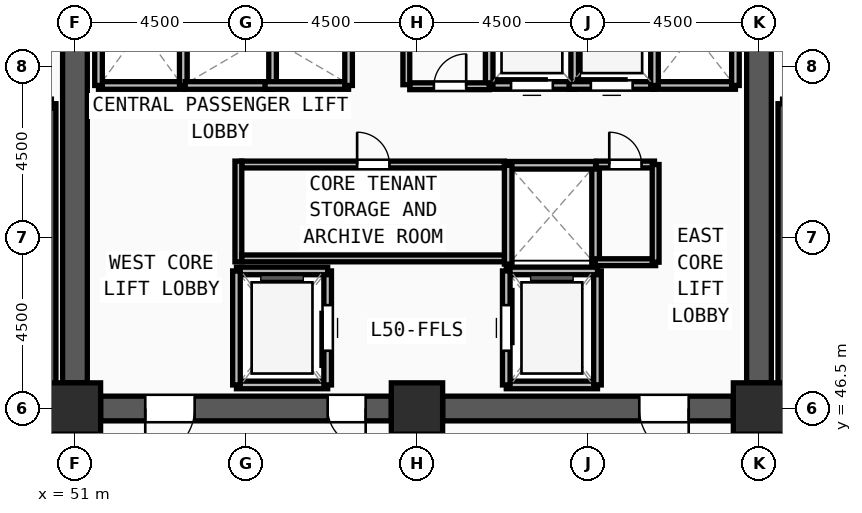
"""IFC4 building model, lengths in metres.
Left out: names, types, materials, properties, quantities, classifications, styles, units other than length and angle.
Written with IfcOpenShell. Run it as: python <this file> out.ifc"""

import sys

from ifc_helpers import new_model, si_unit, direction, frame, frame_2d, origin, origin_2d, place, context, subcontext, project, spatial, rectangle, extrude, source, transform, mapped, element, fill, save


model = new_model("IFC4")
c1 = context("Model", 3, precision=1e-05, world=origin(), true_north=direction((0.0, 1.0)))
c2 = subcontext(c1, "Body", "Model", "MODEL_VIEW")
j1 = project(units=[si_unit("LENGTHUNIT", "METRE"), si_unit("PLANEANGLEUNIT", "RADIAN")], contexts=[c1])
p1 = place(None, origin())
s1 = spatial("IfcSite", under=j1, at=p1, CompositionType="ELEMENT")
p2 = place(p1, origin())
s2 = spatial("IfcBuilding", under=s1, at=p2, CompositionType="ELEMENT")
p3 = place(p2, frame((0.0, 0.0, 194.25)))
s3 = spatial("IfcBuildingStorey", under=s2, at=p3, CompositionType="ELEMENT", Elevation=194.25)
m1 = source(origin(), c2, "Body", "SweptSolid", [
    extrude(rectangle(XDim=1.35, YDim=1.35, at=origin_2d()), origin(), (0.0, 0.0, 1.0), 3.75),
])
for number, where, z_axis, x_axis in (
    (1, (51.0, 46.5, 0.0), (0.0, 0.0, 1.0), (1.0, 0.0, 0.0)),
    (2, (60.0, 46.5, 0.0), (0.0, 0.0, 1.0), (1.0, 0.0, 0.0)),
    (3, (69.0, 46.5, 0.0), (0.0, 0.0, 1.0), (1.0, 0.0, 0.0)),
):
    element("IfcColumn", number, at=place(p3, frame(where, z_axis=z_axis, x_axis=x_axis)), inside=s3, PredefinedType="COLUMN", context=c2, shape_type="MappedRepresentation", body=[
        mapped(m1, transform((0.0, 0.0, 0.0), x_axis=(1.0, 0.0, 0.0), y_axis=(0.0, 1.0, 0.0), z_axis=(0.0, 0.0, 1.0), scale=1.0)),
    ])
p4 = place(p3, frame((69.0, 60.825, 0.0), z_axis=(0.0, 0.0, 1.0), x_axis=(0.0, -1.0, 0.0)))
e4 = element("IfcWall", 4, at=p4, inside=s3, PredefinedType="SHEAR", context=c2, shape_type="SweptSolid", body=[
    extrude(rectangle(XDim=13.65, YDim=0.65, at=frame_2d((6.825, 0.0))), origin(), (0.0, 0.0, 1.0), 3.57),
])
m2 = source(origin(), c2, "Body", "SweptSolid", [
    extrude(rectangle(XDim=1.2, YDim=2.2, at=frame_2d((0.6, 1.1))), frame((0.0, 0.335, 0.0), z_axis=(0.0, -1.0, 0.0), x_axis=(1.0, 0.0, 0.0)), (0.0, 0.0, 1.0), 0.67),
])
p5 = place(p4, frame((1.275, 0.0, 0.0)))
e5 = element("IfcOpeningElement", 5, at=p5, cuts=e4, PredefinedType="OPENING", context=c2, shape_type="MappedRepresentation", body=[
    mapped(m2, transform((0.0, 0.0, 0.0), x_axis=(1.0, 0.0, 0.0), y_axis=(0.0, 1.0, 0.0), z_axis=(0.0, 0.0, 1.0), scale=1.0)),
])
p6 = place(p3, frame((68.325, 46.5, 0.0), z_axis=(0.0, 0.0, 1.0), x_axis=(-1.0, 0.0, 0.0)))
e6 = element("IfcWall", 6, at=p6, inside=s3, PredefinedType="SHEAR", context=c2, shape_type="SweptSolid", body=[
    extrude(rectangle(XDim=7.65, YDim=0.65, at=frame_2d((3.825, 0.0))), origin(), (0.0, 0.0, 1.0), 3.57),
])
m3 = source(origin(), c2, "Body", "SweptSolid", [
    extrude(rectangle(XDim=1.3, YDim=2.2, at=frame_2d((0.65, 1.1))), frame((0.0, 0.335, 0.0), z_axis=(0.0, -1.0, 0.0), x_axis=(1.0, 0.0, 0.0)), (0.0, 0.0, 1.0), 0.67),
])
p7 = place(p6, frame((1.175, 0.0, 0.0)))
e7 = element("IfcOpeningElement", 7, at=p7, cuts=e6, PredefinedType="OPENING", context=c2, shape_type="MappedRepresentation", body=[
    mapped(m3, transform((0.0, 0.0, 0.0), x_axis=(1.0, 0.0, 0.0), y_axis=(0.0, 1.0, 0.0), z_axis=(0.0, 0.0, 1.0), scale=1.0)),
])
p8 = place(p3, frame((59.325, 46.5, 0.0), z_axis=(0.0, 0.0, 1.0), x_axis=(-1.0, 0.0, 0.0)))
e8 = element("IfcWall", 8, at=p8, inside=s3, PredefinedType="SHEAR", context=c2, shape_type="SweptSolid", body=[
    extrude(rectangle(XDim=7.65, YDim=0.65, at=frame_2d((3.825, 0.0))), origin(), (0.0, 0.0, 1.0), 3.57),
])
p9 = place(p8, frame((5.175, 0.0, 0.0)))
e9 = element("IfcOpeningElement", 9, at=p9, cuts=e8, PredefinedType="OPENING", context=c2, shape_type="MappedRepresentation", body=[
    mapped(m3, transform((0.0, 0.0, 0.0), x_axis=(1.0, 0.0, 0.0), y_axis=(0.0, 1.0, 0.0), z_axis=(0.0, 0.0, 1.0), scale=1.0)),
])
m4 = source(origin(), c2, "Body", "SweptSolid", [
    extrude(rectangle(XDim=1.0, YDim=2.2, at=frame_2d((0.5, 1.1))), frame((0.0, 0.335, 0.0), z_axis=(0.0, -1.0, 0.0), x_axis=(1.0, 0.0, 0.0)), (0.0, 0.0, 1.0), 0.67),
])
p10 = place(p8, frame((0.675, 0.0, 0.0)))
e10 = element("IfcOpeningElement", 10, at=p10, cuts=e8, PredefinedType="OPENING", context=c2, shape_type="MappedRepresentation", body=[
    mapped(m4, transform((0.0, 0.0, 0.0), x_axis=(1.0, 0.0, 0.0), y_axis=(0.0, 1.0, 0.0), z_axis=(0.0, 0.0, 1.0), scale=1.0)),
])
p11 = place(p3, frame((51.0, 47.175, 0.0), z_axis=(0.0, 0.0, 1.0), x_axis=(0.0, 1.0, 0.0)))
e11 = element("IfcWall", 11, at=p11, inside=s3, PredefinedType="SHEAR", context=c2, shape_type="SweptSolid", body=[
    extrude(rectangle(XDim=13.65, YDim=0.65, at=frame_2d((6.825, 0.0))), origin(), (0.0, 0.0, 1.0), 3.57),
])
for number, where, z_axis, x_axis in (
    (12, (50.38, 46.7, 0.0), (0.0, 0.0, 1.0), (0.0, 1.0, 0.0)),
    (13, (69.62, 54.52, 0.0), (0.0, 0.0, 1.0), (0.0, -1.0, 0.0)),
):
    element("IfcWall", number, at=place(p3, frame(where, z_axis=z_axis, x_axis=x_axis)), inside=s3, PredefinedType="SOLIDWALL", context=c2, shape_type="SweptSolid", body=[
        extrude(rectangle(XDim=7.82, YDim=0.24, at=frame_2d((3.91, 0.0))), origin(), (0.0, 0.0, 1.0), 3.57),
    ])
p12 = place(p3, frame((55.25, 47.12, 0.0), z_axis=(0.0, 0.0, 1.0), x_axis=(1.0, 0.0, 0.0)))
e14 = element("IfcWall", 14, at=p12, inside=s3, PredefinedType="SOLIDWALL", context=c2, shape_type="SweptSolid", body=[
    extrude(rectangle(XDim=2.4, YDim=0.2, at=frame_2d((1.2, 0.0))), origin(), (0.0, 0.0, 1.0), 3.57),
])
p13 = place(p3, frame((57.65, 47.12, 0.0), z_axis=(0.0, 0.0, 1.0), x_axis=(0.0, 1.0, 0.0)))
e15 = element("IfcWall", 15, at=p13, inside=s3, PredefinedType="SOLIDWALL", context=c2, shape_type="SweptSolid", body=[
    extrude(rectangle(XDim=3.0, YDim=0.2, at=frame_2d((1.5, 0.0))), origin(), (0.0, 0.0, 1.0), 3.57),
])
m5 = source(origin(), c2, "Body", "SweptSolid", [
    extrude(rectangle(XDim=1.2, YDim=2.3, at=frame_2d((0.6, 1.15))), frame((0.0, 0.11, 0.0), z_axis=(0.0, -1.0, 0.0), x_axis=(1.0, 0.0, 0.0)), (0.0, 0.0, 1.0), 0.22),
])
p14 = place(p13, frame((0.9, 0.0, 0.0)))
e16 = element("IfcOpeningElement", 16, at=p14, cuts=e15, PredefinedType="OPENING", context=c2, shape_type="MappedRepresentation", body=[
    mapped(m5, transform((0.0, 0.0, 0.0), x_axis=(1.0, 0.0, 0.0), y_axis=(0.0, 1.0, 0.0), z_axis=(0.0, 0.0, 1.0), scale=1.0)),
])
p15 = place(p3, frame((57.65, 50.12, 0.0), z_axis=(0.0, 0.0, 1.0), x_axis=(-1.0, 0.0, 0.0)))
e17 = element("IfcWall", 17, at=p15, inside=s3, PredefinedType="SOLIDWALL", context=c2, shape_type="SweptSolid", body=[
    extrude(rectangle(XDim=2.4, YDim=0.2, at=frame_2d((1.2, 0.0))), origin(), (0.0, 0.0, 1.0), 3.57),
])
p16 = place(p3, frame((55.25, 50.12, 0.0), z_axis=(0.0, 0.0, 1.0), x_axis=(0.0, -1.0, 0.0)))
e18 = element("IfcWall", 18, at=p16, inside=s3, PredefinedType="SOLIDWALL", context=c2, shape_type="SweptSolid", body=[
    extrude(rectangle(XDim=3.0, YDim=0.2, at=frame_2d((1.5, 0.0))), origin(), (0.0, 0.0, 1.0), 3.57),
])
p17 = place(p3, frame((62.35, 47.12, 0.0), z_axis=(0.0, 0.0, 1.0), x_axis=(1.0, 0.0, 0.0)))
e19 = element("IfcWall", 19, at=p17, inside=s3, PredefinedType="SOLIDWALL", context=c2, shape_type="SweptSolid", body=[
    extrude(rectangle(XDim=2.4, YDim=0.2, at=frame_2d((1.2, 0.0))), origin(), (0.0, 0.0, 1.0), 3.57),
])
p18 = place(p3, frame((64.75, 47.12, 0.0), z_axis=(0.0, 0.0, 1.0), x_axis=(0.0, 1.0, 0.0)))
e20 = element("IfcWall", 20, at=p18, inside=s3, PredefinedType="SOLIDWALL", context=c2, shape_type="SweptSolid", body=[
    extrude(rectangle(XDim=3.0, YDim=0.2, at=frame_2d((1.5, 0.0))), origin(), (0.0, 0.0, 1.0), 3.57),
])
p19 = place(p3, frame((64.75, 50.12, 0.0), z_axis=(0.0, 0.0, 1.0), x_axis=(-1.0, 0.0, 0.0)))
e21 = element("IfcWall", 21, at=p19, inside=s3, PredefinedType="SOLIDWALL", context=c2, shape_type="SweptSolid", body=[
    extrude(rectangle(XDim=2.4, YDim=0.2, at=frame_2d((1.2, 0.0))), origin(), (0.0, 0.0, 1.0), 3.57),
])
p20 = place(p3, frame((62.35, 50.12, 0.0), z_axis=(0.0, 0.0, 1.0), x_axis=(0.0, -1.0, 0.0)))
e22 = element("IfcWall", 22, at=p20, inside=s3, PredefinedType="SOLIDWALL", context=c2, shape_type="SweptSolid", body=[
    extrude(rectangle(XDim=3.0, YDim=0.2, at=frame_2d((1.5, 0.0))), origin(), (0.0, 0.0, 1.0), 3.57),
])
p21 = place(p20, frame((0.9, 0.0, 0.0)))
e23 = element("IfcOpeningElement", 23, at=p21, cuts=e22, PredefinedType="OPENING", context=c2, shape_type="MappedRepresentation", body=[
    mapped(m5, transform((0.0, 0.0, 0.0), x_axis=(1.0, 0.0, 0.0), y_axis=(0.0, 1.0, 0.0), z_axis=(0.0, 0.0, 1.0), scale=1.0)),
])
p22 = place(p3, frame((51.62, 55.0, 0.0), z_axis=(0.0, 0.0, 1.0), x_axis=(1.0, 0.0, 0.0)))
e24 = element("IfcWall", 24, at=p22, inside=s3, PredefinedType="SOLIDWALL", context=c2, shape_type="SweptSolid", body=[
    extrude(rectangle(XDim=2.23, YDim=0.2, at=frame_2d((1.115, 0.0))), origin(), (0.0, 0.0, 1.0), 3.57),
])
for number, where, z_axis, x_axis in (
    (25, (53.85, 55.0, 0.0), (0.0, 0.0, 1.0), (0.0, 1.0, 0.0)),
    (26, (51.62, 58.0, 0.0), (0.0, 0.0, 1.0), (0.0, -1.0, 0.0)),
):
    element("IfcWall", number, at=place(p3, frame(where, z_axis=z_axis, x_axis=x_axis)), inside=s3, PredefinedType="SOLIDWALL", context=c2, shape_type="SweptSolid", body=[
        extrude(rectangle(XDim=3.0, YDim=0.2, at=frame_2d((1.5, 0.0))), origin(), (0.0, 0.0, 1.0), 3.57),
    ])
p23 = place(p3, frame((66.2, 55.0, 0.0), z_axis=(0.0, 0.0, 1.0), x_axis=(1.0, 0.0, 0.0)))
e27 = element("IfcWall", 27, at=p23, inside=s3, PredefinedType="SOLIDWALL", context=c2, shape_type="SweptSolid", body=[
    extrude(rectangle(XDim=2.18, YDim=0.2, at=frame_2d((1.09, 0.0))), origin(), (0.0, 0.0, 1.0), 3.57),
])
p24 = place(p3, frame((68.38, 55.0, 0.0), z_axis=(0.0, 0.0, 1.0), x_axis=(0.0, 1.0, 0.0)))
e28 = element("IfcWall", 28, at=p24, inside=s3, PredefinedType="SOLIDWALL", context=c2, shape_type="SweptSolid", body=[
    extrude(rectangle(XDim=2.75, YDim=0.2, at=frame_2d((1.375, 0.0))), origin(), (0.0, 0.0, 1.0), 3.57),
])
p25 = place(p3, frame((64.7, 50.3, 0.0), z_axis=(0.0, 0.0, 1.0), x_axis=(0.0, 1.0, 0.0)))
e29 = element("IfcWall", 29, at=p25, inside=s3, PredefinedType="SOLIDWALL", context=c2, shape_type="SweptSolid", body=[
    extrude(rectangle(XDim=2.6, YDim=0.2, at=frame_2d((1.3, 0.0))), origin(), (0.0, 0.0, 1.0), 3.57),
])
p26 = place(p3, frame((64.7, 52.9, 0.0), z_axis=(0.0, 0.0, 1.0), x_axis=(-1.0, 0.0, 0.0)))
e30 = element("IfcWall", 30, at=p26, inside=s3, PredefinedType="SOLIDWALL", context=c2, shape_type="SweptSolid", body=[
    extrude(rectangle(XDim=2.3, YDim=0.2, at=frame_2d((1.15, 0.0))), origin(), (0.0, 0.0, 1.0), 3.57),
])
p27 = place(p3, frame((62.4, 52.9, 0.0), z_axis=(0.0, 0.0, 1.0), x_axis=(0.0, -1.0, 0.0)))
e31 = element("IfcWall", 31, at=p27, inside=s3, PredefinedType="SOLIDWALL", context=c2, shape_type="SweptSolid", body=[
    extrude(rectangle(XDim=2.6, YDim=0.2, at=frame_2d((1.3, 0.0))), origin(), (0.0, 0.0, 1.0), 3.57),
])
p28 = place(p3, frame((53.9, 55.0, 0.0), z_axis=(0.0, 0.0, 1.0), x_axis=(1.0, 0.0, 0.0)))
e32 = element("IfcWall", 32, at=p28, inside=s3, PredefinedType="SOLIDWALL", context=c2, shape_type="SweptSolid", body=[
    extrude(rectangle(XDim=2.3, YDim=0.2, at=frame_2d((1.15, 0.0))), origin(), (0.0, 0.0, 1.0), 3.57),
])
p29 = place(p3, frame((56.2, 55.0, 0.0), z_axis=(0.0, 0.0, 1.0), x_axis=(0.0, 1.0, 0.0)))
e33 = element("IfcWall", 33, at=p29, inside=s3, PredefinedType="SOLIDWALL", context=c2, shape_type="SweptSolid", body=[
    extrude(rectangle(XDim=2.6, YDim=0.2, at=frame_2d((1.3, 0.0))), origin(), (0.0, 0.0, 1.0), 3.57),
])
p30 = place(p3, frame((56.0, 55.0, 0.0), z_axis=(0.0, 0.0, 1.0), x_axis=(1.0, 0.0, 0.0)))
e34 = element("IfcWall", 34, at=p30, inside=s3, PredefinedType="SOLIDWALL", context=c2, shape_type="SweptSolid", body=[
    extrude(rectangle(XDim=2.2, YDim=0.2, at=frame_2d((1.1, 0.0))), origin(), (0.0, 0.0, 1.0), 3.57),
])
p31 = place(p3, frame((58.2, 55.0, 0.0), z_axis=(0.0, 0.0, 1.0), x_axis=(0.0, 1.0, 0.0)))
e35 = element("IfcWall", 35, at=p31, inside=s3, PredefinedType="SOLIDWALL", context=c2, shape_type="SweptSolid", body=[
    extrude(rectangle(XDim=2.6, YDim=0.2, at=frame_2d((1.3, 0.0))), origin(), (0.0, 0.0, 1.0), 3.57),
])
p32 = place(p3, frame((61.9, 55.0, 0.0), z_axis=(0.0, 0.0, 1.0), x_axis=(1.0, 0.0, 0.0)))
e36 = element("IfcWall", 36, at=p32, inside=s3, PredefinedType="SOLIDWALL", context=c2, shape_type="SweptSolid", body=[
    extrude(rectangle(XDim=2.25, YDim=0.2, at=frame_2d((1.125, 0.0))), origin(), (0.0, 0.0, 1.0), 3.57),
])
m6 = source(origin(), c2, "Body", "SweptSolid", [
    extrude(rectangle(XDim=1.1, YDim=2.2, at=frame_2d((0.55, 1.1))), frame((0.0, 0.11, 0.0), z_axis=(0.0, -1.0, 0.0), x_axis=(1.0, 0.0, 0.0)), (0.0, 0.0, 1.0), 0.22),
])
p33 = place(p32, frame((0.575, 0.0, 0.0)))
e37 = element("IfcOpeningElement", 37, at=p33, cuts=e36, PredefinedType="OPENING", context=c2, shape_type="MappedRepresentation", body=[
    mapped(m6, transform((0.0, 0.0, 0.0), x_axis=(1.0, 0.0, 0.0), y_axis=(0.0, 1.0, 0.0), z_axis=(0.0, 0.0, 1.0), scale=1.0)),
])
for number, where, z_axis, x_axis in (
    (38, (64.15, 55.0, 0.0), (0.0, 0.0, 1.0), (0.0, 1.0, 0.0)),
    (39, (61.9, 57.6, 0.0), (0.0, 0.0, 1.0), (0.0, -1.0, 0.0)),
):
    element("IfcWall", number, at=place(p3, frame(where, z_axis=z_axis, x_axis=x_axis)), inside=s3, PredefinedType="SOLIDWALL", context=c2, shape_type="SweptSolid", body=[
        extrude(rectangle(XDim=2.6, YDim=0.2, at=frame_2d((1.3, 0.0))), origin(), (0.0, 0.0, 1.0), 3.57),
    ])
p34 = place(p3, frame((64.0, 55.0, 0.0), z_axis=(0.0, 0.0, 1.0), x_axis=(1.0, 0.0, 0.0)))
e40 = element("IfcWall", 40, at=p34, inside=s3, PredefinedType="SOLIDWALL", context=c2, shape_type="SweptSolid", body=[
    extrude(rectangle(XDim=2.25, YDim=0.2, at=frame_2d((1.125, 0.0))), origin(), (0.0, 0.0, 1.0), 3.57),
])
p35 = place(p34, frame((0.575, 0.0, 0.0)))
e41 = element("IfcOpeningElement", 41, at=p35, cuts=e40, PredefinedType="OPENING", context=c2, shape_type="MappedRepresentation", body=[
    mapped(m6, transform((0.0, 0.0, 0.0), x_axis=(1.0, 0.0, 0.0), y_axis=(0.0, 1.0, 0.0), z_axis=(0.0, 0.0, 1.0), scale=1.0)),
])
p36 = place(p3, frame((66.25, 55.0, 0.0), z_axis=(0.0, 0.0, 1.0), x_axis=(0.0, 1.0, 0.0)))
e42 = element("IfcWall", 42, at=p36, inside=s3, PredefinedType="SOLIDWALL", context=c2, shape_type="SweptSolid", body=[
    extrude(rectangle(XDim=2.6, YDim=0.2, at=frame_2d((1.3, 0.0))), origin(), (0.0, 0.0, 1.0), 3.57),
])
p37 = place(p3, frame((55.39, 52.92, 0.0), z_axis=(0.0, 0.0, 1.0), x_axis=(1.0, 0.0, 0.0)))
e43 = element("IfcWall", 43, at=p37, inside=s3, PredefinedType="PARTITIONING", context=c2, shape_type="SweptSolid", body=[
    extrude(rectangle(XDim=6.91, YDim=0.18, at=frame_2d((3.455, 0.0))), origin(), (0.0, 0.0, 1.0), 3.57),
])
m7 = source(origin(), c2, "Body", "SweptSolid", [
    extrude(rectangle(XDim=0.85, YDim=2.1, at=frame_2d((0.425, 1.05))), frame((0.0, 0.1, 0.0), z_axis=(0.0, -1.0, 0.0), x_axis=(1.0, 0.0, 0.0)), (0.0, 0.0, 1.0), 0.2),
])
p38 = place(p37, frame((3.035, 0.0, 0.0)))
e44 = element("IfcOpeningElement", 44, at=p38, cuts=e43, PredefinedType="OPENING", context=c2, shape_type="MappedRepresentation", body=[
    mapped(m7, transform((0.0, 0.0, 0.0), x_axis=(1.0, 0.0, 0.0), y_axis=(0.0, 1.0, 0.0), z_axis=(0.0, 0.0, 1.0), scale=1.0)),
])
p39 = place(p3, frame((59.81, 54.98, 0.0), z_axis=(0.0, 0.0, 1.0), x_axis=(1.0, 0.0, 0.0)))
e45 = element("IfcWall", 45, at=p39, inside=s3, PredefinedType="PARTITIONING", context=c2, shape_type="SweptSolid", body=[
    extrude(rectangle(XDim=2.09, YDim=0.18, at=frame_2d((1.045, 0.0))), origin(), (0.0, 0.0, 1.0), 3.57),
])
p40 = place(p39, frame((0.635, 0.0, 0.0)))
e46 = element("IfcOpeningElement", 46, at=p40, cuts=e45, PredefinedType="OPENING", context=c2, shape_type="MappedRepresentation", body=[
    mapped(m7, transform((0.0, 0.0, 0.0), x_axis=(1.0, 0.0, 0.0), y_axis=(0.0, 1.0, 0.0), z_axis=(0.0, 0.0, 1.0), scale=1.0)),
])
p41 = place(p3, frame((64.72, 52.92, 0.0), z_axis=(0.0, 0.0, 1.0), x_axis=(1.0, 0.0, 0.0)))
e47 = element("IfcWall", 47, at=p41, inside=s3, PredefinedType="PARTITIONING", context=c2, shape_type="SweptSolid", body=[
    extrude(rectangle(XDim=1.53, YDim=0.18, at=frame_2d((0.765, 0.0))), origin(), (0.0, 0.0, 1.0), 3.57),
])
p42 = place(p41, frame((0.34, 0.0, 0.0)))
e48 = element("IfcOpeningElement", 48, at=p42, cuts=e47, PredefinedType="OPENING", context=c2, shape_type="MappedRepresentation", body=[
    mapped(m7, transform((0.0, 0.0, 0.0), x_axis=(1.0, 0.0, 0.0), y_axis=(0.0, 1.0, 0.0), z_axis=(0.0, 0.0, 1.0), scale=1.0)),
])
p43 = place(p3, frame((59.72, 55.02, 0.0), z_axis=(0.0, 0.0, 1.0), x_axis=(0.0, 1.0, 0.0)))
e49 = element("IfcWall", 49, at=p43, inside=s3, PredefinedType="PARTITIONING", context=c2, shape_type="SweptSolid", body=[
    extrude(rectangle(XDim=1.73, YDim=0.18, at=frame_2d((0.865, 0.0))), origin(), (0.0, 0.0, 1.0), 3.57),
])
p44 = place(p3, frame((64.69, 50.35, 0.0), z_axis=(0.0, 0.0, 1.0), x_axis=(1.0, 0.0, 0.0)))
e50 = element("IfcWall", 50, at=p44, inside=s3, PredefinedType="PARTITIONING", context=c2, shape_type="SweptSolid", body=[
    extrude(rectangle(XDim=1.59, YDim=0.18, at=frame_2d((0.795, 0.0))), origin(), (0.0, 0.0, 1.0), 3.57),
])
p45 = place(p3, frame((66.28, 50.35, 0.0), z_axis=(0.0, 0.0, 1.0), x_axis=(0.0, 1.0, 0.0)))
e51 = element("IfcWall", 51, at=p45, inside=s3, PredefinedType="PARTITIONING", context=c2, shape_type="SweptSolid", body=[
    extrude(rectangle(XDim=2.57, YDim=0.18, at=frame_2d((1.285, 0.0))), origin(), (0.0, 0.0, 1.0), 3.57),
])
p46 = place(p3, frame((55.3, 50.36, 0.0), z_axis=(0.0, 0.0, 1.0), x_axis=(0.0, 1.0, 0.0)))
e52 = element("IfcWall", 52, at=p46, inside=s3, PredefinedType="PARTITIONING", context=c2, shape_type="SweptSolid", body=[
    extrude(rectangle(XDim=2.65, YDim=0.18, at=frame_2d((1.325, 0.0))), origin(), (0.0, 0.0, 1.0), 3.57),
])
p47 = place(p3, frame((55.39, 50.45, 0.0), z_axis=(0.0, 0.0, 1.0), x_axis=(1.0, 0.0, 0.0)))
e53 = element("IfcWall", 53, at=p47, inside=s3, PredefinedType="PARTITIONING", context=c2, shape_type="SweptSolid", body=[
    extrude(rectangle(XDim=6.91, YDim=0.18, at=frame_2d((3.455, 0.0))), origin(), (0.0, 0.0, 1.0), 3.57),
])
m8 = source(origin(), c2, "Body", "SweptSolid", [
    extrude(rectangle(XDim=1.3, YDim=2.2, at=frame_2d((0.65, 1.1))), frame((0.0, 0.025, 0.0), z_axis=(0.0, -1.0, 0.0), x_axis=(1.0, 0.0, 0.0)), (0.0, 0.0, 1.0), 0.05),
])
p48 = place(p9, origin())
e54 = element("IfcDoor", 54, at=p48, inside=s3, OperationType="SINGLE_SWING_RIGHT", PredefinedType="DOOR", context=c2, shape_type="MappedRepresentation", body=[
    mapped(m8, transform((0.0, 0.0, 0.0), x_axis=(1.0, 0.0, 0.0), y_axis=(0.0, 1.0, 0.0), z_axis=(0.0, 0.0, 1.0), scale=1.0)),
])
fill(e9, e54)
m9 = source(origin(), c2, "Body", "SweptSolid", [
    extrude(rectangle(XDim=1.0, YDim=2.2, at=frame_2d((0.5, 1.1))), frame((0.0, 0.025, 0.0), z_axis=(0.0, -1.0, 0.0), x_axis=(1.0, 0.0, 0.0)), (0.0, 0.0, 1.0), 0.05),
])
p49 = place(p10, origin())
e55 = element("IfcDoor", 55, at=p49, inside=s3, OperationType="SINGLE_SWING_LEFT", PredefinedType="DOOR", context=c2, shape_type="MappedRepresentation", body=[
    mapped(m9, transform((0.0, 0.0, 0.0), x_axis=(1.0, 0.0, 0.0), y_axis=(0.0, 1.0, 0.0), z_axis=(0.0, 0.0, 1.0), scale=1.0)),
])
fill(e10, e55)
p50 = place(p7, origin())
e56 = element("IfcDoor", 56, at=p50, inside=s3, OperationType="SINGLE_SWING_LEFT", PredefinedType="DOOR", context=c2, shape_type="MappedRepresentation", body=[
    mapped(m8, transform((0.0, 0.0, 0.0), x_axis=(1.0, 0.0, 0.0), y_axis=(0.0, 1.0, 0.0), z_axis=(0.0, 0.0, 1.0), scale=1.0)),
])
fill(e7, e56)
m10 = source(origin(), c2, "Body", "SweptSolid", [
    extrude(rectangle(XDim=1.2, YDim=2.3, at=frame_2d((0.6, 1.15))), frame((0.0, 0.025, 0.0), z_axis=(0.0, -1.0, 0.0), x_axis=(1.0, 0.0, 0.0)), (0.0, 0.0, 1.0), 0.05),
])
p51 = place(p14, origin())
e57 = element("IfcDoor", 57, at=p51, inside=s3, OperationType="SLIDING_TO_LEFT", PredefinedType="DOOR", context=c2, shape_type="MappedRepresentation", body=[
    mapped(m10, transform((0.0, 0.0, 0.0), x_axis=(1.0, 0.0, 0.0), y_axis=(0.0, 1.0, 0.0), z_axis=(0.0, 0.0, 1.0), scale=1.0)),
])
fill(e16, e57)
p52 = place(p21, origin())
e58 = element("IfcDoor", 58, at=p52, inside=s3, OperationType="SLIDING_TO_LEFT", PredefinedType="DOOR", context=c2, shape_type="MappedRepresentation", body=[
    mapped(m10, transform((0.0, 0.0, 0.0), x_axis=(1.0, 0.0, 0.0), y_axis=(0.0, 1.0, 0.0), z_axis=(0.0, 0.0, 1.0), scale=1.0)),
])
fill(e23, e58)
m11 = source(origin(), c2, "Body", "SweptSolid", [
    extrude(rectangle(XDim=1.1, YDim=2.2, at=frame_2d((0.55, 1.1))), frame((0.0, 0.025, 0.0), z_axis=(0.0, -1.0, 0.0), x_axis=(1.0, 0.0, 0.0)), (0.0, 0.0, 1.0), 0.05),
])
p53 = place(p33, origin())
e59 = element("IfcDoor", 59, at=p53, inside=s3, OperationType="SLIDING_TO_LEFT", PredefinedType="DOOR", context=c2, shape_type="MappedRepresentation", body=[
    mapped(m11, transform((0.0, 0.0, 0.0), x_axis=(1.0, 0.0, 0.0), y_axis=(0.0, 1.0, 0.0), z_axis=(0.0, 0.0, 1.0), scale=1.0)),
])
fill(e37, e59)
p54 = place(p35, origin())
e60 = element("IfcDoor", 60, at=p54, inside=s3, OperationType="SLIDING_TO_LEFT", PredefinedType="DOOR", context=c2, shape_type="MappedRepresentation", body=[
    mapped(m11, transform((0.0, 0.0, 0.0), x_axis=(1.0, 0.0, 0.0), y_axis=(0.0, 1.0, 0.0), z_axis=(0.0, 0.0, 1.0), scale=1.0)),
])
fill(e41, e60)
m12 = source(origin(), c2, "Body", "SweptSolid", [
    extrude(rectangle(XDim=0.85, YDim=2.1, at=frame_2d((0.425, 1.05))), frame((0.0, 0.025, 0.0), z_axis=(0.0, -1.0, 0.0), x_axis=(1.0, 0.0, 0.0)), (0.0, 0.0, 1.0), 0.05),
])
p55 = place(p38, origin())
e61 = element("IfcDoor", 61, at=p55, inside=s3, OperationType="SINGLE_SWING_LEFT", PredefinedType="DOOR", context=c2, shape_type="MappedRepresentation", body=[
    mapped(m12, transform((0.0, 0.0, 0.0), x_axis=(1.0, 0.0, 0.0), y_axis=(0.0, 1.0, 0.0), z_axis=(0.0, 0.0, 1.0), scale=1.0)),
])
fill(e44, e61)
p56 = place(p40, origin())
e62 = element("IfcDoor", 62, at=p56, inside=s3, OperationType="SINGLE_SWING_RIGHT", PredefinedType="DOOR", context=c2, shape_type="MappedRepresentation", body=[
    mapped(m12, transform((0.0, 0.0, 0.0), x_axis=(1.0, 0.0, 0.0), y_axis=(0.0, 1.0, 0.0), z_axis=(0.0, 0.0, 1.0), scale=1.0)),
])
fill(e46, e62)
p57 = place(p42, origin())
e63 = element("IfcDoor", 63, at=p57, inside=s3, OperationType="SINGLE_SWING_LEFT", PredefinedType="DOOR", context=c2, shape_type="MappedRepresentation", body=[
    mapped(m12, transform((0.0, 0.0, 0.0), x_axis=(1.0, 0.0, 0.0), y_axis=(0.0, 1.0, 0.0), z_axis=(0.0, 0.0, 1.0), scale=1.0)),
])
fill(e48, e63)
save(model, sys.argv[1])
